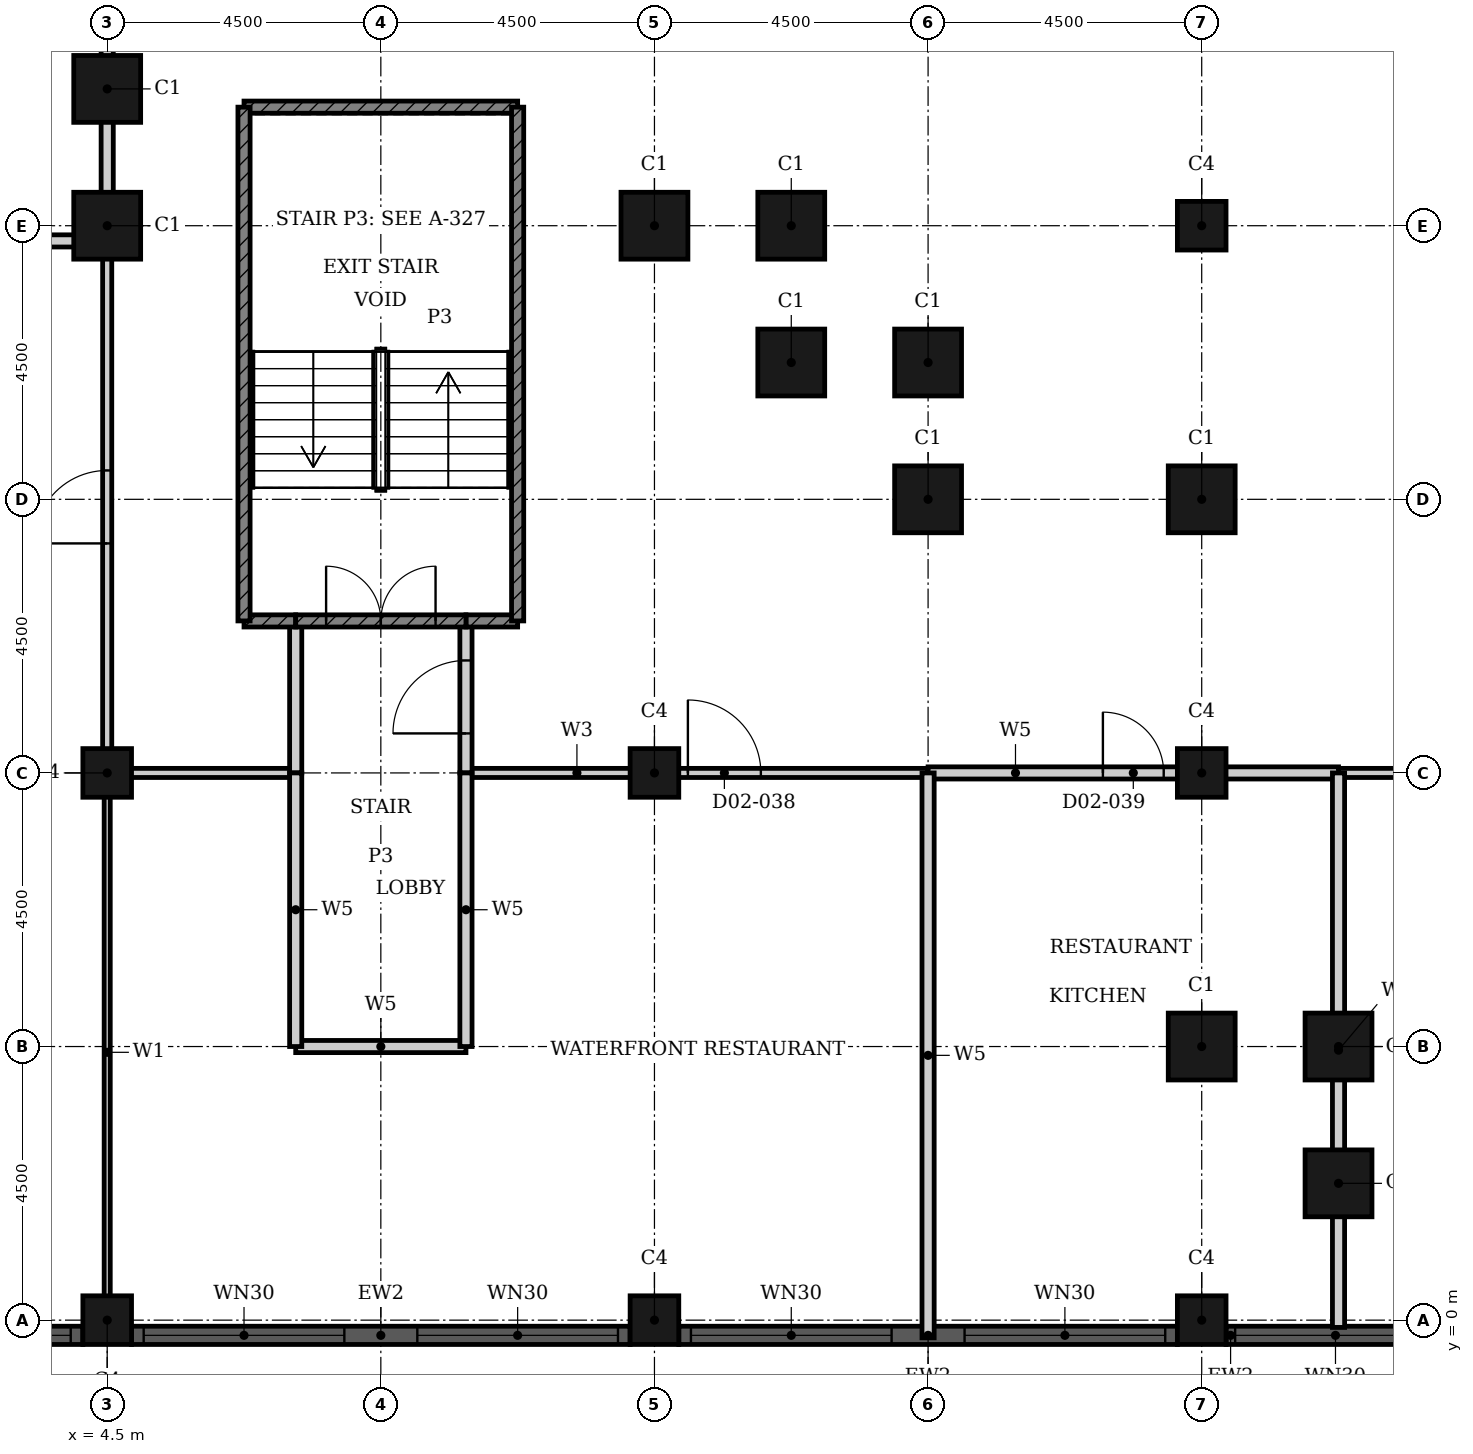
"""IFC4 building model, lengths in metres.
Left out: names, types, materials, properties, quantities, classifications, styles, units other than length and angle.
Written with IfcOpenShell. Run it as: python <this file> out.ifc"""

import sys

from ifc_helpers import new_model, si_unit, direction, frame, frame_2d, origin, origin_2d, place, context, subcontext, project, spatial, rectangle, hollow_rectangle, extrude, element, fill, save


model = new_model("IFC4")
c1 = context("Model", 3, precision=1e-05, world=origin(), true_north=direction((0.0, 1.0)))
c2 = subcontext(c1, "Body", "Model", "MODEL_VIEW")
j1 = project(units=[si_unit("LENGTHUNIT", "METRE"), si_unit("PLANEANGLEUNIT", "RADIAN")], contexts=[c1])
p1 = place(None, origin())
s1 = spatial("IfcSite", under=j1, at=p1, CompositionType="ELEMENT")
p2 = place(p1, origin())
s2 = spatial("IfcBuilding", under=s1, at=p2, CompositionType="ELEMENT")
p3 = place(p2, frame((0.0, 0.0, 12.0)))
s3 = spatial("IfcBuildingStorey", under=s2, at=p3, CompositionType="ELEMENT", Elevation=12.0)
for number, where, z_axis, x_axis in (
    (1, (22.5, 4.5, 0.0), (0.0, 0.0, 1.0), (1.0, 0.0, 0.0)),
    (2, (24.75, 4.5, 0.0), (0.0, 0.0, 1.0), (1.0, 0.0, 0.0)),
    (3, (24.75, 2.25, 0.0), (0.0, 0.0, 1.0), (1.0, 0.0, 0.0)),
    (4, (4.5, 20.25, 0.0), (0.0, 0.0, 1.0), (1.0, 0.0, 0.0)),
    (5, (4.5, 18.0, 0.0), (0.0, 0.0, 1.0), (1.0, 0.0, 0.0)),
    (6, (13.5, 18.0, 0.0), (0.0, 0.0, 1.0), (1.0, 0.0, 0.0)),
    (7, (15.75, 18.0, 0.0), (0.0, 0.0, 1.0), (1.0, 0.0, 0.0)),
    (8, (15.75, 15.75, 0.0), (0.0, 0.0, 1.0), (1.0, 0.0, 0.0)),
    (9, (18.0, 15.75, 0.0), (0.0, 0.0, 1.0), (1.0, 0.0, 0.0)),
    (10, (18.0, 13.5, 0.0), (0.0, 0.0, 1.0), (1.0, 0.0, 0.0)),
    (11, (22.5, 13.5, 0.0), (0.0, 0.0, 1.0), (1.0, 0.0, 0.0)),
):
    element("IfcColumn", number, at=place(p3, frame(where, z_axis=z_axis, x_axis=x_axis)), inside=s3, PredefinedType="COLUMN", context=c2, shape_type="SweptSolid", body=[
        extrude(hollow_rectangle(XDim=1.1, YDim=1.1, WallThickness=0.036, at=origin_2d()), origin(), (0.0, 0.0, 1.0), 5.4),
    ])
for number, where, z_axis, x_axis in (
    (12, (4.5, 0.0, 0.0), (0.0, 0.0, 1.0), (1.0, 0.0, 0.0)),
    (13, (13.5, 0.0, 0.0), (0.0, 0.0, 1.0), (1.0, 0.0, 0.0)),
    (14, (22.5, 0.0, 0.0), (0.0, 0.0, 1.0), (1.0, 0.0, 0.0)),
    (15, (4.5, 9.0, 0.0), (0.0, 0.0, 1.0), (1.0, 0.0, 0.0)),
    (16, (13.5, 9.0, 0.0), (0.0, 0.0, 1.0), (1.0, 0.0, 0.0)),
    (17, (22.5, 9.0, 0.0), (0.0, 0.0, 1.0), (1.0, 0.0, 0.0)),
    (18, (22.5, 18.0, 0.0), (0.0, 0.0, 1.0), (1.0, 0.0, 0.0)),
):
    element("IfcColumn", number, at=place(p3, frame(where, z_axis=z_axis, x_axis=x_axis)), inside=s3, PredefinedType="COLUMN", context=c2, shape_type="SweptSolid", body=[
        extrude(hollow_rectangle(XDim=0.8, YDim=0.8, WallThickness=0.025, at=origin_2d()), origin(), (0.0, 0.0, 1.0), 5.4),
    ])
p4 = place(p3, frame((-4.1, -0.25, 0.0), z_axis=(0.0, 0.0, 1.0), x_axis=(1.0, 0.0, 0.0)))
e19 = element("IfcWall", 19, at=p4, inside=s3, PredefinedType="SOLIDWALL", context=c2, shape_type="SweptSolid", body=[
    extrude(rectangle(XDim=8.2, YDim=0.3, at=frame_2d((4.1, 0.0))), origin(), (0.0, 0.0, 1.0), 5.4),
])
p5 = place(p4, frame((0.2, 0.0, 0.9)))
e20 = element("IfcOpeningElement", 20, at=p5, cuts=e19, PredefinedType="OPENING", context=c2, shape_type="SweptSolid", body=[
    extrude(rectangle(XDim=3.3, YDim=3.5, at=frame_2d((1.65, 1.75))), frame((0.0, 0.16, 0.0), z_axis=(0.0, -1.0, 0.0), x_axis=(1.0, 0.0, 0.0)), (0.0, 0.0, 1.0), 0.32),
])
p6 = place(p4, frame((4.7, 0.0, 0.9)))
e21 = element("IfcOpeningElement", 21, at=p6, cuts=e19, PredefinedType="OPENING", context=c2, shape_type="SweptSolid", body=[
    extrude(rectangle(XDim=3.3, YDim=3.5, at=frame_2d((1.65, 1.75))), frame((0.0, 0.16, 0.0), z_axis=(0.0, -1.0, 0.0), x_axis=(1.0, 0.0, 0.0)), (0.0, 0.0, 1.0), 0.32),
])
p7 = place(p3, frame((4.9, -0.25, 0.0), z_axis=(0.0, 0.0, 1.0), x_axis=(1.0, 0.0, 0.0)))
e22 = element("IfcWall", 22, at=p7, inside=s3, PredefinedType="SOLIDWALL", context=c2, shape_type="SweptSolid", body=[
    extrude(rectangle(XDim=8.2, YDim=0.3, at=frame_2d((4.1, 0.0))), origin(), (0.0, 0.0, 1.0), 5.4),
])
p8 = place(p7, frame((0.2, 0.0, 0.9)))
e23 = element("IfcOpeningElement", 23, at=p8, cuts=e22, PredefinedType="OPENING", context=c2, shape_type="SweptSolid", body=[
    extrude(rectangle(XDim=3.3, YDim=3.5, at=frame_2d((1.65, 1.75))), frame((0.0, 0.16, 0.0), z_axis=(0.0, -1.0, 0.0), x_axis=(1.0, 0.0, 0.0)), (0.0, 0.0, 1.0), 0.32),
])
p9 = place(p7, frame((4.7, 0.0, 0.9)))
e24 = element("IfcOpeningElement", 24, at=p9, cuts=e22, PredefinedType="OPENING", context=c2, shape_type="SweptSolid", body=[
    extrude(rectangle(XDim=3.3, YDim=3.5, at=frame_2d((1.65, 1.75))), frame((0.0, 0.16, 0.0), z_axis=(0.0, -1.0, 0.0), x_axis=(1.0, 0.0, 0.0)), (0.0, 0.0, 1.0), 0.32),
])
p10 = place(p3, frame((13.9, -0.25, 0.0), z_axis=(0.0, 0.0, 1.0), x_axis=(1.0, 0.0, 0.0)))
e25 = element("IfcWall", 25, at=p10, inside=s3, PredefinedType="SOLIDWALL", context=c2, shape_type="SweptSolid", body=[
    extrude(rectangle(XDim=8.2, YDim=0.3, at=frame_2d((4.1, 0.0))), origin(), (0.0, 0.0, 1.0), 5.4),
])
p11 = place(p10, frame((0.2, 0.0, 0.9)))
e26 = element("IfcOpeningElement", 26, at=p11, cuts=e25, PredefinedType="OPENING", context=c2, shape_type="SweptSolid", body=[
    extrude(rectangle(XDim=3.3, YDim=3.5, at=frame_2d((1.65, 1.75))), frame((0.0, 0.16, 0.0), z_axis=(0.0, -1.0, 0.0), x_axis=(1.0, 0.0, 0.0)), (0.0, 0.0, 1.0), 0.32),
])
p12 = place(p10, frame((4.7, 0.0, 0.9)))
e27 = element("IfcOpeningElement", 27, at=p12, cuts=e25, PredefinedType="OPENING", context=c2, shape_type="SweptSolid", body=[
    extrude(rectangle(XDim=3.3, YDim=3.5, at=frame_2d((1.65, 1.75))), frame((0.0, 0.16, 0.0), z_axis=(0.0, -1.0, 0.0), x_axis=(1.0, 0.0, 0.0)), (0.0, 0.0, 1.0), 0.32),
])
p13 = place(p3, frame((22.9, -0.25, 0.0), z_axis=(0.0, 0.0, 1.0), x_axis=(1.0, 0.0, 0.0)))
e28 = element("IfcWall", 28, at=p13, inside=s3, PredefinedType="SOLIDWALL", context=c2, shape_type="SweptSolid", body=[
    extrude(rectangle(XDim=3.55, YDim=0.3, at=frame_2d((1.775, 0.0))), origin(), (0.0, 0.0, 1.0), 5.4),
])
p14 = place(p13, frame((0.15, 0.0, 0.9)))
e29 = element("IfcOpeningElement", 29, at=p14, cuts=e28, PredefinedType="OPENING", context=c2, shape_type="SweptSolid", body=[
    extrude(rectangle(XDim=3.3, YDim=3.5, at=frame_2d((1.65, 1.75))), frame((0.0, 0.16, 0.0), z_axis=(0.0, -1.0, 0.0), x_axis=(1.0, 0.0, 0.0)), (0.0, 0.0, 1.0), 0.32),
])
p15 = place(p3, frame((4.5, 9.0, 0.0), z_axis=(0.0, 0.0, 1.0), x_axis=(1.0, 0.0, 0.0)))
e30 = element("IfcWall", 30, at=p15, inside=s3, PredefinedType="PARTITIONING", context=c2, shape_type="SweptSolid", body=[
    extrude(rectangle(XDim=3.1, YDim=0.15, at=frame_2d((1.55, 0.0))), origin(), (0.0, 0.0, 1.0), 5.05),
])
p16 = place(p3, frame((10.4, 9.0, 0.0), z_axis=(0.0, 0.0, 1.0), x_axis=(1.0, 0.0, 0.0)))
e31 = element("IfcWall", 31, at=p16, inside=s3, PredefinedType="PARTITIONING", context=c2, shape_type="SweptSolid", body=[
    extrude(rectangle(XDim=7.6, YDim=0.15, at=frame_2d((3.8, 0.0))), origin(), (0.0, 0.0, 1.0), 5.05),
])
p17 = place(p16, frame((3.65, 0.0, 0.0)))
e32 = element("IfcOpeningElement", 32, at=p17, cuts=e31, PredefinedType="OPENING", context=c2, shape_type="SweptSolid", body=[
    extrude(rectangle(XDim=1.2, YDim=2.4, at=frame_2d((0.6, 1.2))), frame((0.0, 0.085, 0.0), z_axis=(0.0, -1.0, 0.0), x_axis=(1.0, 0.0, 0.0)), (0.0, 0.0, 1.0), 0.17),
])
p18 = place(p3, frame((24.75, 9.0, 0.0), z_axis=(0.0, 0.0, 1.0), x_axis=(1.0, 0.0, 0.0)))
e33 = element("IfcWall", 33, at=p18, inside=s3, PredefinedType="PARTITIONING", context=c2, shape_type="SweptSolid", body=[
    extrude(rectangle(XDim=17.0, YDim=0.15, at=frame_2d((8.5, 0.0))), origin(), (0.0, 0.0, 1.0), 5.05),
])
p19 = place(p18, frame((7.9, 0.0, 0.0)))
e34 = element("IfcOpeningElement", 34, at=p19, cuts=e33, PredefinedType="OPENING", context=c2, shape_type="SweptSolid", body=[
    extrude(rectangle(XDim=1.2, YDim=2.4, at=frame_2d((0.6, 1.2))), frame((0.0, 0.085, 0.0), z_axis=(0.0, -1.0, 0.0), x_axis=(1.0, 0.0, 0.0)), (0.0, 0.0, 1.0), 0.17),
])
p20 = place(p3, frame((4.5, 9.0, 0.0), z_axis=(0.0, 0.0, 1.0), x_axis=(0.0, 1.0, 0.0)))
e35 = element("IfcWall", 35, at=p20, inside=s3, PredefinedType="PARTITIONING", context=c2, shape_type="SweptSolid", body=[
    extrude(rectangle(XDim=8.75, YDim=0.15, at=frame_2d((4.375, 0.0))), origin(), (0.0, 0.0, 1.0), 5.05),
])
p21 = place(p20, frame((3.775, 0.0, 0.0)))
e36 = element("IfcOpeningElement", 36, at=p21, cuts=e35, PredefinedType="OPENING", context=c2, shape_type="SweptSolid", body=[
    extrude(rectangle(XDim=1.2, YDim=2.4, at=frame_2d((0.6, 1.2))), frame((0.0, 0.085, 0.0), z_axis=(0.0, -1.0, 0.0), x_axis=(1.0, 0.0, 0.0)), (0.0, 0.0, 1.0), 0.17),
])
p22 = place(p3, frame((4.5, -0.19, 0.0), z_axis=(0.0, 0.0, 1.0), x_axis=(0.0, 1.0, 0.0)))
e37 = element("IfcWall", 37, at=p22, inside=s3, PredefinedType="PARTITIONING", context=c2, shape_type="SweptSolid", body=[
    extrude(rectangle(XDim=9.19, YDim=0.1, at=frame_2d((4.595, 0.0))), origin(), (0.0, 0.0, 1.0), 5.05),
])
p23 = place(p3, frame((-4.69, 17.75, 0.0), z_axis=(0.0, 0.0, 1.0), x_axis=(1.0, 0.0, 0.0)))
e38 = element("IfcWall", 38, at=p23, inside=s3, PredefinedType="PARTITIONING", context=c2, shape_type="SweptSolid", body=[
    extrude(rectangle(XDim=9.19, YDim=0.2, at=frame_2d((4.595, 0.0))), origin(), (0.0, 0.0, 1.0), 5.05),
])
p24 = place(p3, frame((7.6, 4.5, 0.0), z_axis=(0.0, 0.0, 1.0), x_axis=(1.0, 0.0, 0.0)))
e39 = element("IfcWall", 39, at=p24, inside=s3, PredefinedType="PARTITIONING", context=c2, shape_type="SweptSolid", body=[
    extrude(rectangle(XDim=2.8, YDim=0.2, at=frame_2d((1.4, 0.0))), origin(), (0.0, 0.0, 1.0), 5.05),
])
p25 = place(p3, frame((18.0, 9.0, 0.0), z_axis=(0.0, 0.0, 1.0), x_axis=(1.0, 0.0, 0.0)))
e40 = element("IfcWall", 40, at=p25, inside=s3, PredefinedType="PARTITIONING", context=c2, shape_type="SweptSolid", body=[
    extrude(rectangle(XDim=6.75, YDim=0.2, at=frame_2d((3.375, 0.0))), origin(), (0.0, 0.0, 1.0), 5.05),
])
p26 = place(p25, frame((2.875, 0.0, 0.0)))
e41 = element("IfcOpeningElement", 41, at=p26, cuts=e40, PredefinedType="OPENING", context=c2, shape_type="SweptSolid", body=[
    extrude(rectangle(XDim=1.0, YDim=2.1, at=frame_2d((0.5, 1.05))), frame((0.0, 0.11, 0.0), z_axis=(0.0, -1.0, 0.0), x_axis=(1.0, 0.0, 0.0)), (0.0, 0.0, 1.0), 0.22),
])
p27 = place(p3, frame((10.4, 9.0, 0.0), z_axis=(0.0, 0.0, 1.0), x_axis=(0.0, 1.0, 0.0)))
e42 = element("IfcWall", 42, at=p27, inside=s3, PredefinedType="PARTITIONING", context=c2, shape_type="SweptSolid", body=[
    extrude(rectangle(XDim=2.5, YDim=0.2, at=frame_2d((1.25, 0.0))), origin(), (0.0, 0.0, 1.0), 5.05),
])
p28 = place(p27, frame((0.65, 0.0, 0.0)))
e43 = element("IfcOpeningElement", 43, at=p28, cuts=e42, PredefinedType="OPENING", context=c2, shape_type="SweptSolid", body=[
    extrude(rectangle(XDim=1.2, YDim=2.1, at=frame_2d((0.6, 1.05))), frame((0.0, 0.11, 0.0), z_axis=(0.0, -1.0, 0.0), x_axis=(1.0, 0.0, 0.0)), (0.0, 0.0, 1.0), 0.22),
])
p29 = place(p3, frame((10.4, 4.5, 0.0), z_axis=(0.0, 0.0, 1.0), x_axis=(0.0, 1.0, 0.0)))
e44 = element("IfcWall", 44, at=p29, inside=s3, PredefinedType="PARTITIONING", context=c2, shape_type="SweptSolid", body=[
    extrude(rectangle(XDim=4.5, YDim=0.2, at=frame_2d((2.25, 0.0))), origin(), (0.0, 0.0, 1.0), 5.05),
])
p30 = place(p3, frame((18.0, -0.29, 0.0), z_axis=(0.0, 0.0, 1.0), x_axis=(0.0, 1.0, 0.0)))
e45 = element("IfcWall", 45, at=p30, inside=s3, PredefinedType="PARTITIONING", context=c2, shape_type="SweptSolid", body=[
    extrude(rectangle(XDim=9.29, YDim=0.2, at=frame_2d((4.645, 0.0))), origin(), (0.0, 0.0, 1.0), 5.05),
])
p31 = place(p3, frame((24.75, -0.12, 0.0), z_axis=(0.0, 0.0, 1.0), x_axis=(0.0, 1.0, 0.0)))
e46 = element("IfcWall", 46, at=p31, inside=s3, PredefinedType="PARTITIONING", context=c2, shape_type="SweptSolid", body=[
    extrude(rectangle(XDim=9.12, YDim=0.2, at=frame_2d((4.56, 0.0))), origin(), (0.0, 0.0, 1.0), 5.05),
])
p32 = place(p3, frame((4.5, 17.75, 0.0), z_axis=(0.0, 0.0, 1.0), x_axis=(0.0, 1.0, 0.0)))
e47 = element("IfcWall", 47, at=p32, inside=s3, PredefinedType="PARTITIONING", context=c2, shape_type="SweptSolid", body=[
    extrude(rectangle(XDim=11.75, YDim=0.2, at=frame_2d((5.875, 0.0))), origin(), (0.0, 0.0, 1.0), 5.05),
])
p33 = place(p32, frame((5.375, 0.0, 0.0)))
e48 = element("IfcOpeningElement", 48, at=p33, cuts=e47, PredefinedType="OPENING", context=c2, shape_type="SweptSolid", body=[
    extrude(rectangle(XDim=1.0, YDim=2.1, at=frame_2d((0.5, 1.05))), frame((0.0, 0.11, 0.0), z_axis=(0.0, -1.0, 0.0), x_axis=(1.0, 0.0, 0.0)), (0.0, 0.0, 1.0), 0.22),
])
p34 = place(p3, frame((7.6, 9.0, 0.0), z_axis=(0.0, 0.0, 1.0), x_axis=(0.0, 1.0, 0.0)))
e49 = element("IfcWall", 49, at=p34, inside=s3, PredefinedType="PARTITIONING", context=c2, shape_type="SweptSolid", body=[
    extrude(rectangle(XDim=2.5, YDim=0.2, at=frame_2d((1.25, 0.0))), origin(), (0.0, 0.0, 1.0), 5.05),
])
p35 = place(p3, frame((7.6, 4.5, 0.0), z_axis=(0.0, 0.0, 1.0), x_axis=(0.0, 1.0, 0.0)))
e50 = element("IfcWall", 50, at=p35, inside=s3, PredefinedType="PARTITIONING", context=c2, shape_type="SweptSolid", body=[
    extrude(rectangle(XDim=4.5, YDim=0.2, at=frame_2d((2.25, 0.0))), origin(), (0.0, 0.0, 1.0), 5.05),
])
for number, where, z_axis, x_axis in (
    (51, (6.75, 11.5, 0.0), (0.0, 0.0, 1.0), (1.0, 0.0, 0.0)),
    (52, (10.4, 11.5, 0.0), (0.0, 0.0, 1.0), (1.0, 0.0, 0.0)),
):
    element("IfcWall", number, at=place(p3, frame(where, z_axis=z_axis, x_axis=x_axis)), inside=s3, PredefinedType="SHEAR", context=c2, shape_type="SweptSolid", body=[
        extrude(rectangle(XDim=0.85, YDim=0.2, at=frame_2d((0.425, 0.0))), origin(), (0.0, 0.0, 1.0), 5.05),
    ])
p36 = place(p3, frame((7.6, 11.5, 0.0), z_axis=(0.0, 0.0, 1.0), x_axis=(1.0, 0.0, 0.0)))
e53 = element("IfcWall", 53, at=p36, inside=s3, PredefinedType="SHEAR", context=c2, shape_type="SweptSolid", body=[
    extrude(rectangle(XDim=2.8, YDim=0.2, at=frame_2d((1.4, 0.0))), origin(), (0.0, 0.0, 1.0), 5.05),
])
p37 = place(p36, frame((0.5, 0.0, 0.0)))
e54 = element("IfcOpeningElement", 54, at=p37, cuts=e53, PredefinedType="OPENING", context=c2, shape_type="SweptSolid", body=[
    extrude(rectangle(XDim=1.8, YDim=2.1, at=frame_2d((0.9, 1.05))), frame((0.0, 0.11, 0.0), z_axis=(0.0, -1.0, 0.0), x_axis=(1.0, 0.0, 0.0)), (0.0, 0.0, 1.0), 0.22),
])
p38 = place(p3, frame((6.75, 19.95, 0.0), z_axis=(0.0, 0.0, 1.0), x_axis=(1.0, 0.0, 0.0)))
e55 = element("IfcWall", 55, at=p38, inside=s3, PredefinedType="SHEAR", context=c2, shape_type="SweptSolid", body=[
    extrude(rectangle(XDim=4.5, YDim=0.2, at=frame_2d((2.25, 0.0))), origin(), (0.0, 0.0, 1.0), 5.05),
])
for number, where, z_axis, x_axis in (
    (56, (11.25, 11.5, 0.0), (0.0, 0.0, 1.0), (0.0, 1.0, 0.0)),
    (57, (6.75, 11.5, 0.0), (0.0, 0.0, 1.0), (0.0, 1.0, 0.0)),
):
    element("IfcWall", number, at=place(p3, frame(where, z_axis=z_axis, x_axis=x_axis)), inside=s3, PredefinedType="SHEAR", context=c2, shape_type="SweptSolid", body=[
        extrude(rectangle(XDim=8.45, YDim=0.2, at=frame_2d((4.225, 0.0))), origin(), (0.0, 0.0, 1.0), 5.05),
    ])
p39 = place(p6, origin())
e58 = element("IfcWindow", 58, at=p39, inside=s3, PartitioningType="SINGLE_PANEL", PredefinedType="WINDOW", context=c2, shape_type="SweptSolid", body=[
    extrude(rectangle(XDim=3.3, YDim=3.5, at=frame_2d((1.65, 1.75))), frame((0.0, 0.03, 0.0), z_axis=(0.0, -1.0, 0.0), x_axis=(1.0, 0.0, 0.0)), (0.0, 0.0, 1.0), 0.06),
])
fill(e21, e58)
p40 = place(p8, origin())
e59 = element("IfcWindow", 59, at=p40, inside=s3, PartitioningType="SINGLE_PANEL", PredefinedType="WINDOW", context=c2, shape_type="SweptSolid", body=[
    extrude(rectangle(XDim=3.3, YDim=3.5, at=frame_2d((1.65, 1.75))), frame((0.0, 0.03, 0.0), z_axis=(0.0, -1.0, 0.0), x_axis=(1.0, 0.0, 0.0)), (0.0, 0.0, 1.0), 0.06),
])
fill(e23, e59)
p41 = place(p9, origin())
e60 = element("IfcWindow", 60, at=p41, inside=s3, PartitioningType="SINGLE_PANEL", PredefinedType="WINDOW", context=c2, shape_type="SweptSolid", body=[
    extrude(rectangle(XDim=3.3, YDim=3.5, at=frame_2d((1.65, 1.75))), frame((0.0, 0.03, 0.0), z_axis=(0.0, -1.0, 0.0), x_axis=(1.0, 0.0, 0.0)), (0.0, 0.0, 1.0), 0.06),
])
fill(e24, e60)
p42 = place(p11, origin())
e61 = element("IfcWindow", 61, at=p42, inside=s3, PartitioningType="SINGLE_PANEL", PredefinedType="WINDOW", context=c2, shape_type="SweptSolid", body=[
    extrude(rectangle(XDim=3.3, YDim=3.5, at=frame_2d((1.65, 1.75))), frame((0.0, 0.03, 0.0), z_axis=(0.0, -1.0, 0.0), x_axis=(1.0, 0.0, 0.0)), (0.0, 0.0, 1.0), 0.06),
])
fill(e26, e61)
p43 = place(p12, origin())
e62 = element("IfcWindow", 62, at=p43, inside=s3, PartitioningType="SINGLE_PANEL", PredefinedType="WINDOW", context=c2, shape_type="SweptSolid", body=[
    extrude(rectangle(XDim=3.3, YDim=3.5, at=frame_2d((1.65, 1.75))), frame((0.0, 0.03, 0.0), z_axis=(0.0, -1.0, 0.0), x_axis=(1.0, 0.0, 0.0)), (0.0, 0.0, 1.0), 0.06),
])
fill(e27, e62)
p44 = place(p14, origin())
e63 = element("IfcWindow", 63, at=p44, inside=s3, PartitioningType="SINGLE_PANEL", PredefinedType="WINDOW", context=c2, shape_type="SweptSolid", body=[
    extrude(rectangle(XDim=3.3, YDim=3.5, at=frame_2d((1.65, 1.75))), frame((0.0, 0.03, 0.0), z_axis=(0.0, -1.0, 0.0), x_axis=(1.0, 0.0, 0.0)), (0.0, 0.0, 1.0), 0.06),
])
fill(e29, e63)
p45 = place(p28, origin())
e64 = element("IfcDoor", 64, at=p45, inside=s3, OperationType="SINGLE_SWING_RIGHT", PredefinedType="DOOR", context=c2, shape_type="SweptSolid", body=[
    extrude(rectangle(XDim=1.2, YDim=2.1, at=frame_2d((0.6, 1.05))), frame((0.0, 0.025, 0.0), z_axis=(0.0, -1.0, 0.0), x_axis=(1.0, 0.0, 0.0)), (0.0, 0.0, 1.0), 0.05),
])
fill(e43, e64)
p46 = place(p37, origin())
e65 = element("IfcDoor", 65, at=p46, inside=s3, OperationType="DOUBLE_DOOR_SINGLE_SWING", PredefinedType="DOOR", context=c2, shape_type="SweptSolid", body=[
    extrude(rectangle(XDim=1.8, YDim=2.1, at=frame_2d((0.9, 1.05))), frame((0.0, 0.025, 0.0), z_axis=(0.0, -1.0, 0.0), x_axis=(1.0, 0.0, 0.0)), (0.0, 0.0, 1.0), 0.05),
])
fill(e54, e65)
p47 = place(p21, origin())
e66 = element("IfcDoor", 66, at=p47, inside=s3, OperationType="SINGLE_SWING_LEFT", PredefinedType="DOOR", context=c2, shape_type="SweptSolid", body=[
    extrude(rectangle(XDim=1.2, YDim=2.4, at=frame_2d((0.6, 1.2))), frame((0.0, 0.025, 0.0), z_axis=(0.0, -1.0, 0.0), x_axis=(1.0, 0.0, 0.0)), (0.0, 0.0, 1.0), 0.05),
])
fill(e36, e66)
p48 = place(p17, origin())
e67 = element("IfcDoor", 67, at=p48, inside=s3, OperationType="SINGLE_SWING_RIGHT", PredefinedType="DOOR", context=c2, shape_type="SweptSolid", body=[
    extrude(rectangle(XDim=1.2, YDim=2.4, at=frame_2d((0.6, 1.2))), frame((0.0, 0.025, 0.0), z_axis=(0.0, -1.0, 0.0), x_axis=(1.0, 0.0, 0.0)), (0.0, 0.0, 1.0), 0.05),
])
fill(e32, e67)
p49 = place(p26, origin())
e68 = element("IfcDoor", 68, at=p49, inside=s3, OperationType="SINGLE_SWING_RIGHT", PredefinedType="DOOR", context=c2, shape_type="SweptSolid", body=[
    extrude(rectangle(XDim=1.0, YDim=2.1, at=frame_2d((0.5, 1.05))), frame((0.0, 0.025, 0.0), z_axis=(0.0, -1.0, 0.0), x_axis=(1.0, 0.0, 0.0)), (0.0, 0.0, 1.0), 0.05),
])
fill(e41, e68)
save(model, sys.argv[1])
